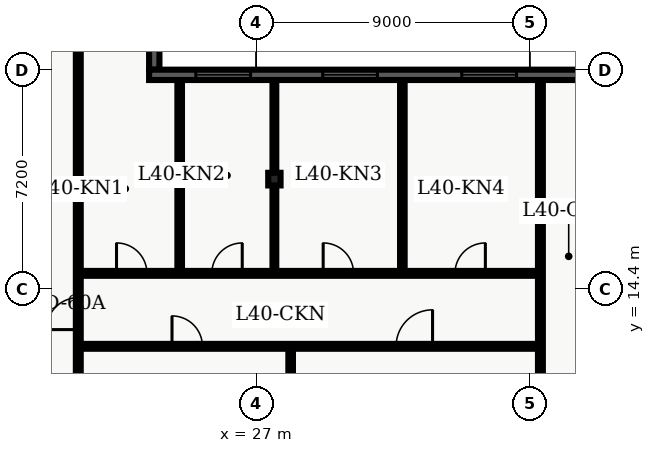
"""IFC4 building model, lengths in metres.
Left out: names, types, materials, properties, quantities, classifications, styles, units other than length and angle.
Written with IfcOpenShell. Run it as: python <this file> out.ifc"""

import sys

from ifc_helpers import new_model, entity, si_unit, converted_unit, direction, frame, origin_with_axes, origin_2d_with_axis, place, context, subcontext, project, spatial, polyline, rectangle, i_section, outline, extrude, element, fill, save


model = new_model("IFC4")
c1 = context("Model", 3, precision=1e-05, world=origin_with_axes(), true_north=direction((0.0, 1.0)))
c2 = subcontext(c1, "Body", "Model", "MODEL_VIEW")
j1 = project(units=[si_unit("LENGTHUNIT", "METRE"), converted_unit("PLANEANGLEUNIT", "DEGREE", entity("IfcPlaneAngleMeasure", 0.017), si_unit("PLANEANGLEUNIT", "RADIAN"), dimensions=[0, 0, 0, 0, 0, 0, 0])], contexts=[c1])
p1 = place(None, origin_with_axes())
s1 = spatial("IfcSite", under=j1, at=p1, CompositionType="ELEMENT")
p2 = place(p1, origin_with_axes())
s2 = spatial("IfcBuilding", under=s1, at=p2, CompositionType="ELEMENT")
p3 = place(p2, frame((0.0, 0.0, 164.1), z_axis=(0.0, 0.0, 1.0), x_axis=(1.0, 0.0, 0.0)))
s3 = spatial("IfcBuildingStorey", under=s2, at=p3, CompositionType="ELEMENT", Elevation=164.1)
p4 = place(p3, frame((27.6, 18.0, 0.0), z_axis=(0.0, 0.0, 1.0), x_axis=(1.0, 0.0, 0.0)))
e1 = element("IfcColumn", 1, at=p4, inside=s3, PredefinedType="COLUMN", context=c2, shape_type="SweptSolid", body=[
    extrude(i_section(OverallWidth=0.406, OverallDepth=0.416, WebThickness=0.03, FlangeThickness=0.048, FilletRadius=0.022, at=origin_2d_with_axis()), origin_with_axes(), (0.0, 0.0, 1.0), 3.9),
])
p5 = place(p3, frame((21.15, 7.8, 0.0), z_axis=(0.0, 0.0, 1.0), x_axis=(0.0, 1.0, 0.0)))
e2 = element("IfcWall", 2, at=p5, inside=s3, PredefinedType="PARTITIONING", context=c2, shape_type="SweptSolid", body=[
    extrude(outline(polyline([(0.0, -0.08), (32.7, -0.08), (32.7, 0.08), (0.0, 0.08), (0.0, -0.08)])), origin_with_axes(), (0.0, 0.0, 1.0), 2.7),
])
p6 = place(p5, frame((5.775, 0.0, 0.0), z_axis=(0.0, 0.0, 1.0), x_axis=(1.0, 0.0, 0.0)))
e3 = element("IfcOpeningElement", 3, at=p6, cuts=e2, PredefinedType="OPENING", context=c2, shape_type="SweptSolid", body=[
    extrude(rectangle(XDim=1.05, YDim=0.18, at=origin_2d_with_axis()), origin_with_axes(), (0.0, 0.0, 1.0), 2.15),
])
p7 = place(p3, frame((21.15, 12.5, 0.0), z_axis=(0.0, 0.0, 1.0), x_axis=(1.0, 0.0, 0.0)))
e4 = element("IfcWall", 4, at=p7, inside=s3, PredefinedType="PARTITIONING", context=c2, shape_type="SweptSolid", body=[
    extrude(outline(polyline([(0.0, -0.08), (15.2, -0.08), (15.2, 0.08), (0.0, 0.08), (0.0, -0.08)])), origin_with_axes(), (0.0, 0.0, 1.0), 2.7),
])
p8 = place(p7, frame((3.583, 0.0, 0.0), z_axis=(0.0, 0.0, 1.0), x_axis=(1.0, 0.0, 0.0)))
e5 = element("IfcOpeningElement", 5, at=p8, cuts=e4, PredefinedType="OPENING", context=c2, shape_type="SweptSolid", body=[
    extrude(rectangle(XDim=1.0, YDim=0.18, at=origin_2d_with_axis()), origin_with_axes(), (0.0, 0.0, 1.0), 2.15),
])
p9 = place(p7, frame((11.053, 0.0, 0.0), z_axis=(0.0, 0.0, 1.0), x_axis=(1.0, 0.0, 0.0)))
e6 = element("IfcOpeningElement", 6, at=p9, cuts=e4, PredefinedType="OPENING", context=c2, shape_type="SweptSolid", body=[
    extrude(rectangle(XDim=1.2, YDim=0.18, at=origin_2d_with_axis()), origin_with_axes(), (0.0, 0.0, 1.0), 2.2),
])
p10 = place(p3, frame((21.15, 14.9, 0.0), z_axis=(0.0, 0.0, 1.0), x_axis=(1.0, 0.0, 0.0)))
e7 = element("IfcWall", 7, at=p10, inside=s3, PredefinedType="PARTITIONING", context=c2, shape_type="SweptSolid", body=[
    extrude(outline(polyline([(0.0, -0.08), (15.2, -0.08), (15.2, 0.08), (0.0, 0.08), (0.0, -0.08)])), origin_with_axes(), (0.0, 0.0, 1.0), 2.7),
])
p11 = place(p10, frame((1.758, 0.0, 0.0), z_axis=(0.0, 0.0, 1.0), x_axis=(1.0, 0.0, 0.0)))
e8 = element("IfcOpeningElement", 8, at=p11, cuts=e7, PredefinedType="OPENING", context=c2, shape_type="SweptSolid", body=[
    extrude(rectangle(XDim=1.0, YDim=0.18, at=origin_2d_with_axis()), origin_with_axes(), (0.0, 0.0, 1.0), 2.15),
])
p12 = place(p10, frame((4.893, 0.0, 0.0), z_axis=(0.0, 0.0, 1.0), x_axis=(1.0, 0.0, 0.0)))
e9 = element("IfcOpeningElement", 9, at=p12, cuts=e7, PredefinedType="OPENING", context=c2, shape_type="SweptSolid", body=[
    extrude(rectangle(XDim=1.0, YDim=0.18, at=origin_2d_with_axis()), origin_with_axes(), (0.0, 0.0, 1.0), 2.15),
])
p13 = place(p10, frame((8.555, 0.0, 0.0), z_axis=(0.0, 0.0, 1.0), x_axis=(1.0, 0.0, 0.0)))
e10 = element("IfcOpeningElement", 10, at=p13, cuts=e7, PredefinedType="OPENING", context=c2, shape_type="SweptSolid", body=[
    extrude(rectangle(XDim=1.0, YDim=0.18, at=origin_2d_with_axis()), origin_with_axes(), (0.0, 0.0, 1.0), 2.15),
])
p14 = place(p10, frame((12.889, 0.0, 0.0), z_axis=(0.0, 0.0, 1.0), x_axis=(1.0, 0.0, 0.0)))
e11 = element("IfcOpeningElement", 11, at=p14, cuts=e7, PredefinedType="OPENING", context=c2, shape_type="SweptSolid", body=[
    extrude(rectangle(XDim=1.0, YDim=0.18, at=origin_2d_with_axis()), origin_with_axes(), (0.0, 0.0, 1.0), 2.15),
])
p15 = place(p3, frame((36.35, 4.35, 0.0), z_axis=(0.0, 0.0, 1.0), x_axis=(0.0, 1.0, 0.0)))
e12 = element("IfcWall", 12, at=p15, inside=s3, PredefinedType="PARTITIONING", context=c2, shape_type="SweptSolid", body=[
    extrude(outline(polyline([(0.0, -0.08), (16.95, -0.08), (16.95, 0.08), (0.0, 0.08), (0.0, -0.08)])), origin_with_axes(), (0.0, 0.0, 1.0), 2.7),
])
p16 = place(p3, frame((28.135, 0.335, 0.0), z_axis=(0.0, 0.0, 1.0), x_axis=(0.0, 1.0, 0.0)))
e13 = element("IfcWall", 13, at=p16, inside=s3, PredefinedType="PARTITIONING", context=c2, shape_type="SweptSolid", body=[
    extrude(outline(polyline([(0.0, -0.075), (12.045, -0.075), (12.045, 0.075), (0.0, 0.075), (0.0, -0.075)])), origin_with_axes(), (0.0, 0.0, 1.0), 2.7),
])
p17 = place(p3, frame((24.485, 15.02, 0.0), z_axis=(0.0, 0.0, 1.0), x_axis=(0.0, 1.0, 0.0)))
e14 = element("IfcWall", 14, at=p17, inside=s3, PredefinedType="PARTITIONING", context=c2, shape_type="SweptSolid", body=[
    extrude(outline(polyline([(0.0, -0.075), (6.245, -0.075), (6.245, 0.075), (0.0, 0.075), (0.0, -0.075)])), origin_with_axes(), (0.0, 0.0, 1.0), 2.7),
])
p18 = place(p3, frame((27.6, 15.02, 0.0), z_axis=(0.0, 0.0, 1.0), x_axis=(0.0, 1.0, 0.0)))
e15 = element("IfcWall", 15, at=p18, inside=s3, PredefinedType="PARTITIONING", context=c2, shape_type="SweptSolid", body=[
    extrude(outline(polyline([(0.0, -0.062), (6.245, -0.062), (6.245, 0.062), (0.0, 0.062), (0.0, -0.062)])), origin_with_axes(), (0.0, 0.0, 1.0), 2.7),
])
p19 = place(p3, frame((31.809, 15.02, 0.0), z_axis=(0.0, 0.0, 1.0), x_axis=(0.0, 1.0, 0.0)))
e16 = element("IfcWall", 16, at=p19, inside=s3, PredefinedType="PARTITIONING", context=c2, shape_type="SweptSolid", body=[
    extrude(outline(polyline([(0.0, -0.075), (6.245, -0.075), (6.245, 0.075), (0.0, 0.075), (0.0, -0.075)])), origin_with_axes(), (0.0, 0.0, 1.0), 2.7),
])
p20 = place(p3, frame((23.649, 45.74, 0.0), z_axis=(0.0, 0.0, 1.0), x_axis=(0.0, -1.0, 0.0)))
e17 = element("IfcWall", 17, at=p20, inside=s3, PredefinedType="SOLIDWALL", context=c2, shape_type="SweptSolid", body=[
    extrude(outline(polyline([(0.0, -0.17), (24.14, -0.17), (24.14, 0.17), (0.0, 0.17), (0.0, -0.17)])), origin_with_axes(), (0.0, 0.0, 1.0), 3.66),
])
p21 = place(p20, frame((2.894, 0.0, 0.45), z_axis=(0.0, 0.0, 1.0), x_axis=(1.0, 0.0, 0.0)))
e18 = element("IfcOpeningElement", 18, at=p21, cuts=e17, PredefinedType="OPENING", context=c2, shape_type="SweptSolid", body=[
    extrude(rectangle(XDim=1.6, YDim=0.36, at=origin_2d_with_axis()), origin_with_axes(), (0.0, 0.0, 1.0), 2.2),
])
p22 = place(p20, frame((7.482, 0.0, 0.45), z_axis=(0.0, 0.0, 1.0), x_axis=(1.0, 0.0, 0.0)))
e19 = element("IfcOpeningElement", 19, at=p22, cuts=e17, PredefinedType="OPENING", context=c2, shape_type="SweptSolid", body=[
    extrude(rectangle(XDim=1.6, YDim=0.36, at=origin_2d_with_axis()), origin_with_axes(), (0.0, 0.0, 1.0), 2.2),
])
p23 = place(p20, frame((12.07, 0.0, 0.45), z_axis=(0.0, 0.0, 1.0), x_axis=(1.0, 0.0, 0.0)))
e20 = element("IfcOpeningElement", 20, at=p23, cuts=e17, PredefinedType="OPENING", context=c2, shape_type="SweptSolid", body=[
    extrude(rectangle(XDim=1.6, YDim=0.36, at=origin_2d_with_axis()), origin_with_axes(), (0.0, 0.0, 1.0), 2.2),
])
p24 = place(p20, frame((16.658, 0.0, 0.45), z_axis=(0.0, 0.0, 1.0), x_axis=(1.0, 0.0, 0.0)))
e21 = element("IfcOpeningElement", 21, at=p24, cuts=e17, PredefinedType="OPENING", context=c2, shape_type="SweptSolid", body=[
    extrude(rectangle(XDim=1.6, YDim=0.36, at=origin_2d_with_axis()), origin_with_axes(), (0.0, 0.0, 1.0), 2.2),
])
p25 = place(p20, frame((21.246, 0.0, 0.45), z_axis=(0.0, 0.0, 1.0), x_axis=(1.0, 0.0, 0.0)))
e22 = element("IfcOpeningElement", 22, at=p25, cuts=e17, PredefinedType="OPENING", context=c2, shape_type="SweptSolid", body=[
    extrude(rectangle(XDim=1.6, YDim=0.36, at=origin_2d_with_axis()), origin_with_axes(), (0.0, 0.0, 1.0), 2.2),
])
p26 = place(p3, frame((23.479, 21.43, 0.0), z_axis=(0.0, 0.0, 1.0), x_axis=(1.0, 0.0, 0.0)))
e23 = element("IfcWall", 23, at=p26, inside=s3, PredefinedType="SOLIDWALL", context=c2, shape_type="SweptSolid", body=[
    extrude(outline(polyline([(0.0, -0.17), (14.921, -0.17), (14.921, 0.17), (0.0, 0.17), (0.0, -0.17)])), origin_with_axes(), (0.0, 0.0, 1.0), 3.66),
])
p27 = place(p26, frame((2.437, 0.0, 0.45), z_axis=(0.0, 0.0, 1.0), x_axis=(1.0, 0.0, 0.0)))
e24 = element("IfcOpeningElement", 24, at=p27, cuts=e23, PredefinedType="OPENING", context=c2, shape_type="SweptSolid", body=[
    extrude(rectangle(XDim=1.8, YDim=0.36, at=origin_2d_with_axis()), origin_with_axes(), (0.0, 0.0, 1.0), 2.1),
])
p28 = place(p26, frame((6.61, 0.0, 0.45), z_axis=(0.0, 0.0, 1.0), x_axis=(1.0, 0.0, 0.0)))
e25 = element("IfcOpeningElement", 25, at=p28, cuts=e23, PredefinedType="OPENING", context=c2, shape_type="SweptSolid", body=[
    extrude(rectangle(XDim=1.8, YDim=0.36, at=origin_2d_with_axis()), origin_with_axes(), (0.0, 0.0, 1.0), 2.1),
])
p29 = place(p26, frame((11.184, 0.0, 0.45), z_axis=(0.0, 0.0, 1.0), x_axis=(1.0, 0.0, 0.0)))
e26 = element("IfcOpeningElement", 26, at=p29, cuts=e23, PredefinedType="OPENING", context=c2, shape_type="SweptSolid", body=[
    extrude(rectangle(XDim=1.8, YDim=0.36, at=origin_2d_with_axis()), origin_with_axes(), (0.0, 0.0, 1.0), 2.1),
])
p30 = place(p5, frame((5.775, 0.0, 0.0), z_axis=(0.0, 0.0, 1.0), x_axis=(1.0, 0.0, 0.0)))
e27 = element("IfcDoor", 27, at=p30, inside=s3, OperationType="SINGLE_SWING_LEFT", PredefinedType="DOOR", context=c2, shape_type="SweptSolid", body=[
    extrude(rectangle(XDim=1.05, YDim=0.09, at=origin_2d_with_axis()), origin_with_axes(), (0.0, 0.0, 1.0), 2.15),
])
fill(e3, e27)
p31 = place(p7, frame((3.583, 0.0, 0.0), z_axis=(0.0, 0.0, 1.0), x_axis=(1.0, 0.0, 0.0)))
e28 = element("IfcDoor", 28, at=p31, inside=s3, OperationType="SINGLE_SWING_LEFT", PredefinedType="DOOR", context=c2, shape_type="SweptSolid", body=[
    extrude(rectangle(XDim=1.0, YDim=0.09, at=origin_2d_with_axis()), origin_with_axes(), (0.0, 0.0, 1.0), 2.15),
])
fill(e5, e28)
p32 = place(p7, frame((11.053, 0.0, 0.0), z_axis=(0.0, 0.0, 1.0), x_axis=(1.0, 0.0, 0.0)))
e29 = element("IfcDoor", 29, at=p32, inside=s3, OperationType="SINGLE_SWING_RIGHT", PredefinedType="DOOR", context=c2, shape_type="SweptSolid", body=[
    extrude(rectangle(XDim=1.2, YDim=0.09, at=origin_2d_with_axis()), origin_with_axes(), (0.0, 0.0, 1.0), 2.2),
])
fill(e6, e29)
p33 = place(p10, frame((1.758, 0.0, 0.0), z_axis=(0.0, 0.0, 1.0), x_axis=(1.0, 0.0, 0.0)))
e30 = element("IfcDoor", 30, at=p33, inside=s3, OperationType="SINGLE_SWING_LEFT", PredefinedType="DOOR", context=c2, shape_type="SweptSolid", body=[
    extrude(rectangle(XDim=1.0, YDim=0.09, at=origin_2d_with_axis()), origin_with_axes(), (0.0, 0.0, 1.0), 2.15),
])
fill(e8, e30)
p34 = place(p10, frame((4.893, 0.0, 0.0), z_axis=(0.0, 0.0, 1.0), x_axis=(1.0, 0.0, 0.0)))
e31 = element("IfcDoor", 31, at=p34, inside=s3, OperationType="SINGLE_SWING_RIGHT", PredefinedType="DOOR", context=c2, shape_type="SweptSolid", body=[
    extrude(rectangle(XDim=1.0, YDim=0.09, at=origin_2d_with_axis()), origin_with_axes(), (0.0, 0.0, 1.0), 2.15),
])
fill(e9, e31)
p35 = place(p10, frame((8.555, 0.0, 0.0), z_axis=(0.0, 0.0, 1.0), x_axis=(1.0, 0.0, 0.0)))
e32 = element("IfcDoor", 32, at=p35, inside=s3, OperationType="SINGLE_SWING_LEFT", PredefinedType="DOOR", context=c2, shape_type="SweptSolid", body=[
    extrude(rectangle(XDim=1.0, YDim=0.09, at=origin_2d_with_axis()), origin_with_axes(), (0.0, 0.0, 1.0), 2.15),
])
fill(e10, e32)
p36 = place(p10, frame((12.889, 0.0, 0.0), z_axis=(0.0, 0.0, 1.0), x_axis=(1.0, 0.0, 0.0)))
e33 = element("IfcDoor", 33, at=p36, inside=s3, OperationType="SINGLE_SWING_RIGHT", PredefinedType="DOOR", context=c2, shape_type="SweptSolid", body=[
    extrude(rectangle(XDim=1.0, YDim=0.09, at=origin_2d_with_axis()), origin_with_axes(), (0.0, 0.0, 1.0), 2.15),
])
fill(e11, e33)
p37 = place(p26, frame((2.437, 0.0, 0.45), z_axis=(0.0, 0.0, 1.0), x_axis=(1.0, 0.0, 0.0)))
e34 = element("IfcWindow", 34, at=p37, inside=s3, PredefinedType="WINDOW", context=c2, shape_type="SweptSolid", body=[
    extrude(rectangle(XDim=1.8, YDim=0.09, at=origin_2d_with_axis()), origin_with_axes(), (0.0, 0.0, 1.0), 2.1),
])
fill(e24, e34)
p38 = place(p26, frame((6.61, 0.0, 0.45), z_axis=(0.0, 0.0, 1.0), x_axis=(1.0, 0.0, 0.0)))
e35 = element("IfcWindow", 35, at=p38, inside=s3, PredefinedType="WINDOW", context=c2, shape_type="SweptSolid", body=[
    extrude(rectangle(XDim=1.8, YDim=0.09, at=origin_2d_with_axis()), origin_with_axes(), (0.0, 0.0, 1.0), 2.1),
])
fill(e25, e35)
p39 = place(p26, frame((11.184, 0.0, 0.45), z_axis=(0.0, 0.0, 1.0), x_axis=(1.0, 0.0, 0.0)))
e36 = element("IfcWindow", 36, at=p39, inside=s3, PredefinedType="WINDOW", context=c2, shape_type="SweptSolid", body=[
    extrude(rectangle(XDim=1.8, YDim=0.09, at=origin_2d_with_axis()), origin_with_axes(), (0.0, 0.0, 1.0), 2.1),
])
fill(e26, e36)
save(model, sys.argv[1])
